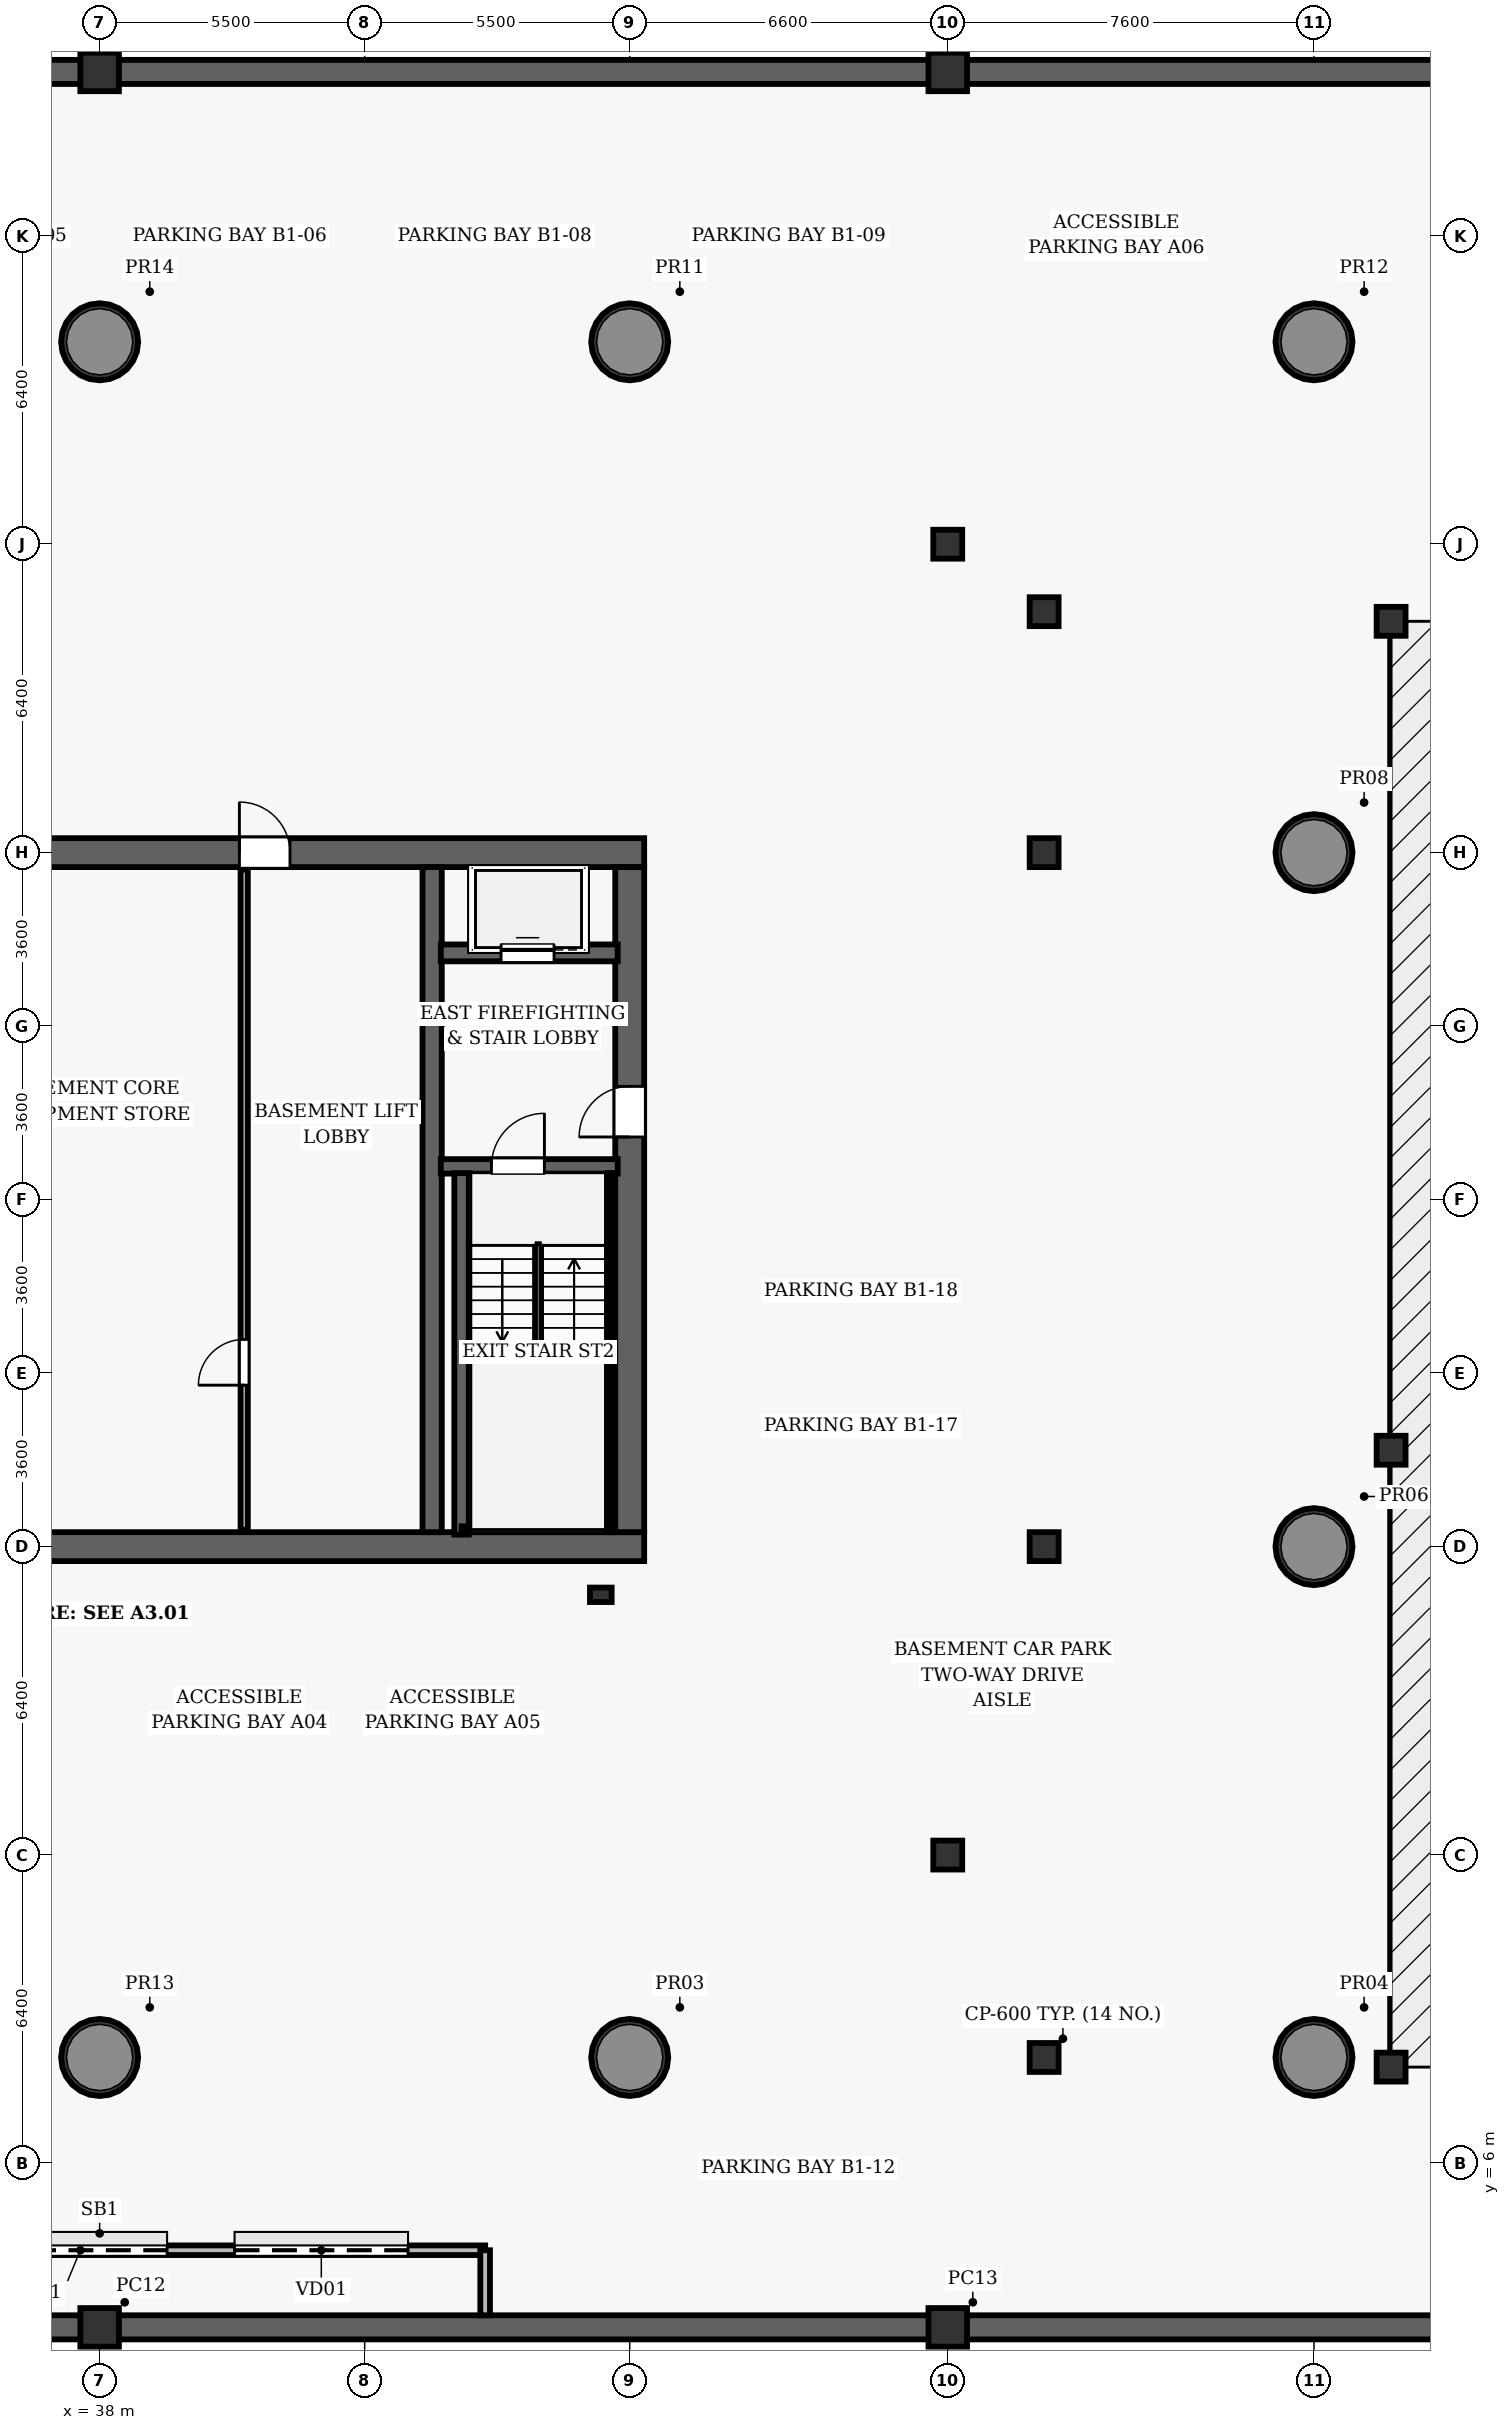
"""IFC4 building model, lengths in metres.
Left out: names, types, materials, properties, quantities, classifications, styles, units other than length and angle.
Written with IfcOpenShell. Run it as: python <this file> out.ifc"""

import sys

from ifc_helpers import new_model, si_unit, direction, frame, frame_2d, origin, origin_2d, place, context, subcontext, project, spatial, rectangle, hollow_circle, extrude, element, fill, save


model = new_model("IFC4")
c1 = context("Model", 3, precision=1e-05, world=origin(), true_north=direction((0.0, 1.0)))
c2 = subcontext(c1, "Body", "Model", "MODEL_VIEW")
j1 = project(units=[si_unit("LENGTHUNIT", "METRE"), si_unit("PLANEANGLEUNIT", "RADIAN")], contexts=[c1])
p1 = place(None, origin())
s1 = spatial("IfcSite", under=j1, at=p1, CompositionType="ELEMENT")
p2 = place(p1, origin())
s2 = spatial("IfcBuilding", under=s1, at=p2, CompositionType="ELEMENT")
p3 = place(p2, frame((0.0, 0.0, -6.0)))
s3 = spatial("IfcBuildingStorey", under=s2, at=p3, CompositionType="ELEMENT", Elevation=-6.0)
for number, where, z_axis, x_axis in (
    (1, (0.25, 2.6, -0.45), (0.0, 0.0, 1.0), (1.0, 0.0, 0.0)),
    (2, (38.0, 2.6, -0.45), (0.0, 0.0, 1.0), (1.0, 0.0, 0.0)),
    (3, (0.25, 49.4, -0.45), (0.0, 0.0, 1.0), (1.0, 0.0, 0.0)),
    (4, (38.0, 49.4, -0.45), (0.0, 0.0, 1.0), (1.0, 0.0, 0.0)),
):
    element("IfcWall", number, at=place(p3, frame(where, z_axis=z_axis, x_axis=x_axis)), inside=s3, PredefinedType="USERDEFINED", context=c2, shape_type="SweptSolid", body=[
        extrude(rectangle(XDim=37.75, YDim=0.5, at=frame_2d((18.875, 0.0))), origin(), (0.0, 0.0, 1.0), 6.1),
    ])
p4 = place(p3, frame((26.7, 18.8, 0.0), z_axis=(0.0, 0.0, 1.0), x_axis=(1.0, 0.0, 0.0)))
e5 = element("IfcWall", 5, at=p4, inside=s3, PredefinedType="SHEAR", context=c2, shape_type="SweptSolid", body=[
    extrude(rectangle(XDim=22.6, YDim=0.6, at=frame_2d((11.3, 0.0))), origin(), (0.0, 0.0, 1.0), 6.0),
])
p5 = place(p3, frame((26.7, 33.2, 0.0), z_axis=(0.0, 0.0, 1.0), x_axis=(1.0, 0.0, 0.0)))
e6 = element("IfcWall", 6, at=p5, inside=s3, PredefinedType="SHEAR", context=c2, shape_type="SweptSolid", body=[
    extrude(rectangle(XDim=22.6, YDim=0.6, at=frame_2d((11.3, 0.0))), origin(), (0.0, 0.0, 1.0), 6.0),
])
p6 = place(p5, frame((14.2, 0.0, 0.0)))
e7 = element("IfcOpeningElement", 7, at=p6, cuts=e6, PredefinedType="OPENING", context=c2, shape_type="SweptSolid", body=[
    extrude(rectangle(XDim=1.05, YDim=2.15, at=frame_2d((0.525, 1.075))), frame((0.0, 0.31, 0.0), z_axis=(0.0, -1.0, 0.0), x_axis=(1.0, 0.0, 0.0)), (0.0, 0.0, 1.0), 0.62),
])
p7 = place(p3, frame((49.0, 19.1, 0.0), z_axis=(0.0, 0.0, 1.0), x_axis=(0.0, 1.0, 0.0)))
e8 = element("IfcWall", 8, at=p7, inside=s3, PredefinedType="SHEAR", context=c2, shape_type="SweptSolid", body=[
    extrude(rectangle(XDim=13.8, YDim=0.6, at=frame_2d((6.9, 0.0))), origin(), (0.0, 0.0, 1.0), 6.0),
])
p8 = place(p7, frame((8.2, 0.0, 0.0)))
e9 = element("IfcOpeningElement", 9, at=p8, cuts=e8, PredefinedType="OPENING", context=c2, shape_type="SweptSolid", body=[
    extrude(rectangle(XDim=1.05, YDim=2.15, at=frame_2d((0.525, 1.075))), frame((0.0, 0.31, 0.0), z_axis=(0.0, -1.0, 0.0), x_axis=(1.0, 0.0, 0.0)), (0.0, 0.0, 1.0), 0.62),
])
p9 = place(p3, frame((44.9, 19.1, 0.0), z_axis=(0.0, 0.0, 1.0), x_axis=(0.0, 1.0, 0.0)))
e10 = element("IfcWall", 10, at=p9, inside=s3, PredefinedType="SHEAR", context=c2, shape_type="SweptSolid", body=[
    extrude(rectangle(XDim=13.8, YDim=0.4, at=frame_2d((6.9, 0.0))), origin(), (0.0, 0.0, 1.0), 6.0),
])
for number, where, z_axis, x_axis in (
    (11, (38.0, 2.6, -0.45), (0.0, 0.0, 1.0), (1.0, 0.0, 0.0)),
    (12, (55.6, 2.6, -0.45), (0.0, 0.0, 1.0), (1.0, 0.0, 0.0)),
    (13, (38.0, 49.4, -0.45), (0.0, 0.0, 1.0), (1.0, 0.0, 0.0)),
    (14, (55.6, 49.4, -0.45), (0.0, 0.0, 1.0), (1.0, 0.0, 0.0)),
):
    element("IfcColumn", number, at=place(p3, frame(where, z_axis=z_axis, x_axis=x_axis)), inside=s3, PredefinedType="COLUMN", context=c2, shape_type="SweptSolid", body=[
        extrude(rectangle(XDim=0.8, YDim=0.8, at=origin_2d()), origin(), (0.0, 0.0, 1.0), 6.45),
    ])
for number, where, z_axis, x_axis in (
    (15, (38.0, 8.2, -0.45), (0.0, 0.0, 1.0), (1.0, 0.0, 0.0)),
    (16, (49.0, 8.2, -0.45), (0.0, 0.0, 1.0), (1.0, 0.0, 0.0)),
    (17, (63.2, 8.2, -0.45), (0.0, 0.0, 1.0), (1.0, 0.0, 0.0)),
    (18, (63.2, 18.8, -0.45), (0.0, 0.0, 1.0), (1.0, 0.0, 0.0)),
    (19, (63.2, 33.2, -0.45), (0.0, 0.0, 1.0), (1.0, 0.0, 0.0)),
    (20, (38.0, 43.8, -0.45), (0.0, 0.0, 1.0), (1.0, 0.0, 0.0)),
    (21, (49.0, 43.8, -0.45), (0.0, 0.0, 1.0), (1.0, 0.0, 0.0)),
    (22, (63.2, 43.8, -0.45), (0.0, 0.0, 1.0), (1.0, 0.0, 0.0)),
):
    element("IfcColumn", number, at=place(p3, frame(where, z_axis=z_axis, x_axis=x_axis)), inside=s3, PredefinedType="COLUMN", context=c2, shape_type="SweptSolid", body=[
        extrude(hollow_circle(Radius=0.8, WallThickness=0.06, at=origin_2d()), origin(), (0.0, 0.0, 1.0), 6.45),
    ])
for number, where, z_axis, x_axis in (
    (23, (57.6, 8.2, -0.45), (0.0, 0.0, 1.0), (1.0, 0.0, 0.0)),
    (24, (57.6, 18.8, -0.45), (0.0, 0.0, 1.0), (1.0, 0.0, 0.0)),
    (25, (57.6, 33.2, -0.45), (0.0, 0.0, 1.0), (1.0, 0.0, 0.0)),
    (26, (57.6, 38.2, -0.45), (0.0, 0.0, 1.0), (1.0, 0.0, 0.0)),
    (27, (64.8, 8.0, -0.45), (0.0, 0.0, 1.0), (1.0, 0.0, 0.0)),
    (28, (64.8, 38.0, -0.45), (0.0, 0.0, 1.0), (1.0, 0.0, 0.0)),
    (29, (55.6, 12.4, -0.45), (0.0, 0.0, 1.0), (1.0, 0.0, 0.0)),
    (30, (55.6, 39.6, -0.45), (0.0, 0.0, 1.0), (1.0, 0.0, 0.0)),
):
    element("IfcColumn", number, at=place(p3, frame(where, z_axis=z_axis, x_axis=x_axis)), inside=s3, PredefinedType="COLUMN", context=c2, shape_type="SweptSolid", body=[
        extrude(rectangle(XDim=0.6, YDim=0.6, at=origin_2d()), origin(), (0.0, 0.0, 1.0), 6.45),
    ])
p10 = place(p3, frame((64.8, 20.8, -0.45), z_axis=(0.0, 0.0, 1.0), x_axis=(1.0, 0.0, 0.0)))
e31 = element("IfcColumn", 31, at=p10, inside=s3, PredefinedType="COLUMN", context=c2, shape_type="SweptSolid", body=[
    extrude(rectangle(XDim=0.6, YDim=0.6, at=origin_2d()), origin(), (0.0, 0.0, 1.0), 2.66),
])
p11 = place(p3, frame((45.08, 26.69, -0.45), z_axis=(0.0, 0.0, 1.0), x_axis=(1.0, 0.0, 0.0)))
e32 = element("IfcWall", 32, at=p11, inside=s3, PredefinedType="SHEAR", context=c2, shape_type="SweptSolid", body=[
    extrude(rectangle(XDim=3.67, YDim=0.3, at=frame_2d((1.835, 0.0))), origin(), (0.0, 0.0, 1.0), 6.45),
])
p12 = place(p11, frame((1.05, 0.0, 0.45)))
e33 = element("IfcOpeningElement", 33, at=p12, cuts=e32, PredefinedType="OPENING", context=c2, shape_type="SweptSolid", body=[
    extrude(rectangle(XDim=1.1, YDim=2.15, at=frame_2d((0.55, 1.075))), frame((0.0, 0.16, 0.0), z_axis=(0.0, -1.0, 0.0), x_axis=(1.0, 0.0, 0.0)), (0.0, 0.0, 1.0), 0.32),
])
p13 = place(p3, frame((45.51, 19.05, -0.45), z_axis=(0.0, 0.0, 1.0), x_axis=(0.0, 1.0, 0.0)))
e34 = element("IfcWall", 34, at=p13, inside=s3, PredefinedType="SHEAR", context=c2, shape_type="SweptSolid", body=[
    extrude(rectangle(XDim=7.5, YDim=0.3, at=frame_2d((3.75, 0.0))), origin(), (0.0, 0.0, 1.0), 6.45),
])
p14 = place(p3, frame((48.605, 19.1, -0.45), z_axis=(0.0, 0.0, 1.0), x_axis=(0.0, 1.0, 0.0)))
e35 = element("IfcWall", 35, at=p14, inside=s3, PredefinedType="SHEAR", context=c2, shape_type="SweptSolid", body=[
    extrude(rectangle(XDim=7.45, YDim=0.12, at=frame_2d((3.725, 0.0))), origin(), (0.0, 0.0, 1.0), 6.45),
])
p15 = place(p3, frame((45.51, 19.16, -0.45), z_axis=(0.0, 0.0, 1.0), x_axis=(1.0, 0.0, 0.0)))
e36 = element("IfcWall", 36, at=p15, inside=s3, PredefinedType="SHEAR", context=c2, shape_type="SweptSolid", body=[
    extrude(rectangle(XDim=3.095, YDim=0.12, at=frame_2d((1.547, 0.0))), origin(), (0.0, 0.0, 1.0), 6.45),
])
p16 = place(p3, frame((45.08, 31.12, 0.0), z_axis=(0.0, 0.0, 1.0), x_axis=(1.0, 0.0, 0.0)))
e37 = element("IfcWall", 37, at=p16, inside=s3, PredefinedType="SHEAR", context=c2, shape_type="SweptSolid", body=[
    extrude(rectangle(XDim=3.67, YDim=0.35, at=frame_2d((1.835, 0.0))), origin(), (0.0, 0.0, 1.0), 4.71),
])
p17 = place(p16, frame((1.25, 0.0, 0.0)))
e38 = element("IfcOpeningElement", 38, at=p17, cuts=e37, PredefinedType="OPENING", context=c2, shape_type="SweptSolid", body=[
    extrude(rectangle(XDim=1.1, YDim=2.15, at=frame_2d((0.55, 1.075))), frame((0.0, 0.185, 0.0), z_axis=(0.0, -1.0, 0.0), x_axis=(1.0, 0.0, 0.0)), (0.0, 0.0, 1.0), 0.37),
])
p18 = place(p3, frame((41.0, 19.15, 0.0), z_axis=(0.0, 0.0, 1.0), x_axis=(0.0, 1.0, 0.0)))
e39 = element("IfcWall", 39, at=p18, inside=s3, PredefinedType="PARTITIONING", context=c2, shape_type="SweptSolid", body=[
    extrude(rectangle(XDim=13.7, YDim=0.15, at=frame_2d((6.85, 0.0))), origin(), (0.0, 0.0, 1.0), 4.71),
])
p19 = place(p18, frame((3.0, 0.0, 0.0)))
e40 = element("IfcOpeningElement", 40, at=p19, cuts=e39, PredefinedType="OPENING", context=c2, shape_type="SweptSolid", body=[
    extrude(rectangle(XDim=0.95, YDim=2.15, at=frame_2d((0.475, 1.075))), frame((0.0, 0.085, 0.0), z_axis=(0.0, -1.0, 0.0), x_axis=(1.0, 0.0, 0.0)), (0.0, 0.0, 1.0), 0.17),
])
p20 = place(p3, frame((48.4, 17.8, -0.45), z_axis=(0.0, 0.0, 1.0), x_axis=(1.0, 0.0, 0.0)))
e41 = element("IfcColumn", 41, at=p20, inside=s3, PredefinedType="PILASTER", context=c2, shape_type="SweptSolid", body=[
    extrude(rectangle(XDim=0.45, YDim=0.3, at=origin_2d()), origin(), (0.0, 0.0, 1.0), 6.45),
])
p21 = place(p3, frame((30.0, 4.2, 0.0), z_axis=(0.0, 0.0, 1.0), x_axis=(1.0, 0.0, 0.0)))
e42 = element("IfcWall", 42, at=p21, inside=s3, PredefinedType="PARTITIONING", context=c2, shape_type="SweptSolid", body=[
    extrude(rectangle(XDim=16.0, YDim=0.2, at=frame_2d((8.0, 0.0))), origin(), (0.0, 0.0, 1.0), 4.71),
])
p22 = place(p21, frame((0.8, 0.0, 0.0)))
e43 = element("IfcOpeningElement", 43, at=p22, cuts=e42, PredefinedType="OPENING", context=c2, shape_type="SweptSolid", body=[
    extrude(rectangle(XDim=3.6, YDim=3.8, at=frame_2d((1.8, 1.9))), frame((0.0, 0.11, 0.0), z_axis=(0.0, -1.0, 0.0), x_axis=(1.0, 0.0, 0.0)), (0.0, 0.0, 1.0), 0.22),
])
p23 = place(p21, frame((5.8, 0.0, 0.0)))
e44 = element("IfcOpeningElement", 44, at=p23, cuts=e42, PredefinedType="OPENING", context=c2, shape_type="SweptSolid", body=[
    extrude(rectangle(XDim=3.6, YDim=3.8, at=frame_2d((1.8, 1.9))), frame((0.0, 0.11, 0.0), z_axis=(0.0, -1.0, 0.0), x_axis=(1.0, 0.0, 0.0)), (0.0, 0.0, 1.0), 0.22),
])
p24 = place(p21, frame((10.8, 0.0, 0.0)))
e45 = element("IfcOpeningElement", 45, at=p24, cuts=e42, PredefinedType="OPENING", context=c2, shape_type="SweptSolid", body=[
    extrude(rectangle(XDim=3.6, YDim=3.8, at=frame_2d((1.8, 1.9))), frame((0.0, 0.11, 0.0), z_axis=(0.0, -1.0, 0.0), x_axis=(1.0, 0.0, 0.0)), (0.0, 0.0, 1.0), 0.22),
])
p25 = place(p3, frame((46.0, 2.85, 0.0), z_axis=(0.0, 0.0, 1.0), x_axis=(0.0, 1.0, 0.0)))
e46 = element("IfcWall", 46, at=p25, inside=s3, PredefinedType="PARTITIONING", context=c2, shape_type="SweptSolid", body=[
    extrude(rectangle(XDim=1.35, YDim=0.2, at=frame_2d((0.675, 0.0))), origin(), (0.0, 0.0, 1.0), 4.71),
])
p26 = place(p12, origin())
e47 = element("IfcDoor", 47, at=p26, inside=s3, OperationType="SINGLE_SWING_RIGHT", PredefinedType="DOOR", context=c2, shape_type="SweptSolid", body=[
    extrude(rectangle(XDim=1.1, YDim=2.15, at=frame_2d((0.55, 1.075))), frame((0.0, 0.025, 0.0), z_axis=(0.0, -1.0, 0.0), x_axis=(1.0, 0.0, 0.0)), (0.0, 0.0, 1.0), 0.05),
])
fill(e33, e47)
p27 = place(p8, origin())
e48 = element("IfcDoor", 48, at=p27, inside=s3, OperationType="SINGLE_SWING_LEFT", PredefinedType="DOOR", context=c2, shape_type="SweptSolid", body=[
    extrude(rectangle(XDim=1.05, YDim=2.15, at=frame_2d((0.525, 1.075))), frame((0.0, 0.025, 0.0), z_axis=(0.0, -1.0, 0.0), x_axis=(1.0, 0.0, 0.0)), (0.0, 0.0, 1.0), 0.05),
])
fill(e9, e48)
p28 = place(p19, origin())
e49 = element("IfcDoor", 49, at=p28, inside=s3, OperationType="SINGLE_SWING_LEFT", PredefinedType="DOOR", context=c2, shape_type="SweptSolid", body=[
    extrude(rectangle(XDim=0.95, YDim=2.15, at=frame_2d((0.475, 1.075))), frame((0.0, 0.025, 0.0), z_axis=(0.0, -1.0, 0.0), x_axis=(1.0, 0.0, 0.0)), (0.0, 0.0, 1.0), 0.05),
])
fill(e40, e49)
p29 = place(p6, origin())
e50 = element("IfcDoor", 50, at=p29, inside=s3, OperationType="SINGLE_SWING_LEFT", PredefinedType="DOOR", context=c2, shape_type="SweptSolid", body=[
    extrude(rectangle(XDim=1.05, YDim=2.15, at=frame_2d((0.525, 1.075))), frame((0.0, 0.025, 0.0), z_axis=(0.0, -1.0, 0.0), x_axis=(1.0, 0.0, 0.0)), (0.0, 0.0, 1.0), 0.05),
])
fill(e7, e50)
p30 = place(p23, origin())
e51 = element("IfcDoor", 51, at=p30, inside=s3, OperationType="ROLLINGUP", PredefinedType="TRAPDOOR", context=c2, shape_type="SweptSolid", body=[
    extrude(rectangle(XDim=3.6, YDim=3.8, at=frame_2d((1.8, 1.9))), frame((0.0, 0.025, 0.0), z_axis=(0.0, -1.0, 0.0), x_axis=(1.0, 0.0, 0.0)), (0.0, 0.0, 1.0), 0.05),
])
fill(e44, e51)
p31 = place(p24, origin())
e52 = element("IfcDoor", 52, at=p31, inside=s3, OperationType="ROLLINGUP", PredefinedType="TRAPDOOR", context=c2, shape_type="SweptSolid", body=[
    extrude(rectangle(XDim=3.6, YDim=3.8, at=frame_2d((1.8, 1.9))), frame((0.0, 0.025, 0.0), z_axis=(0.0, -1.0, 0.0), x_axis=(1.0, 0.0, 0.0)), (0.0, 0.0, 1.0), 0.05),
])
fill(e45, e52)
p32 = place(p17, origin())
e53 = element("IfcDoor", 53, at=p32, inside=s3, OperationType="SLIDING_TO_LEFT", PredefinedType="DOOR", context=c2, shape_type="SweptSolid", body=[
    extrude(rectangle(XDim=1.1, YDim=2.15, at=frame_2d((0.55, 1.075))), frame((0.0, 0.025, 0.0), z_axis=(0.0, -1.0, 0.0), x_axis=(1.0, 0.0, 0.0)), (0.0, 0.0, 1.0), 0.05),
])
fill(e38, e53)
save(model, sys.argv[1])
